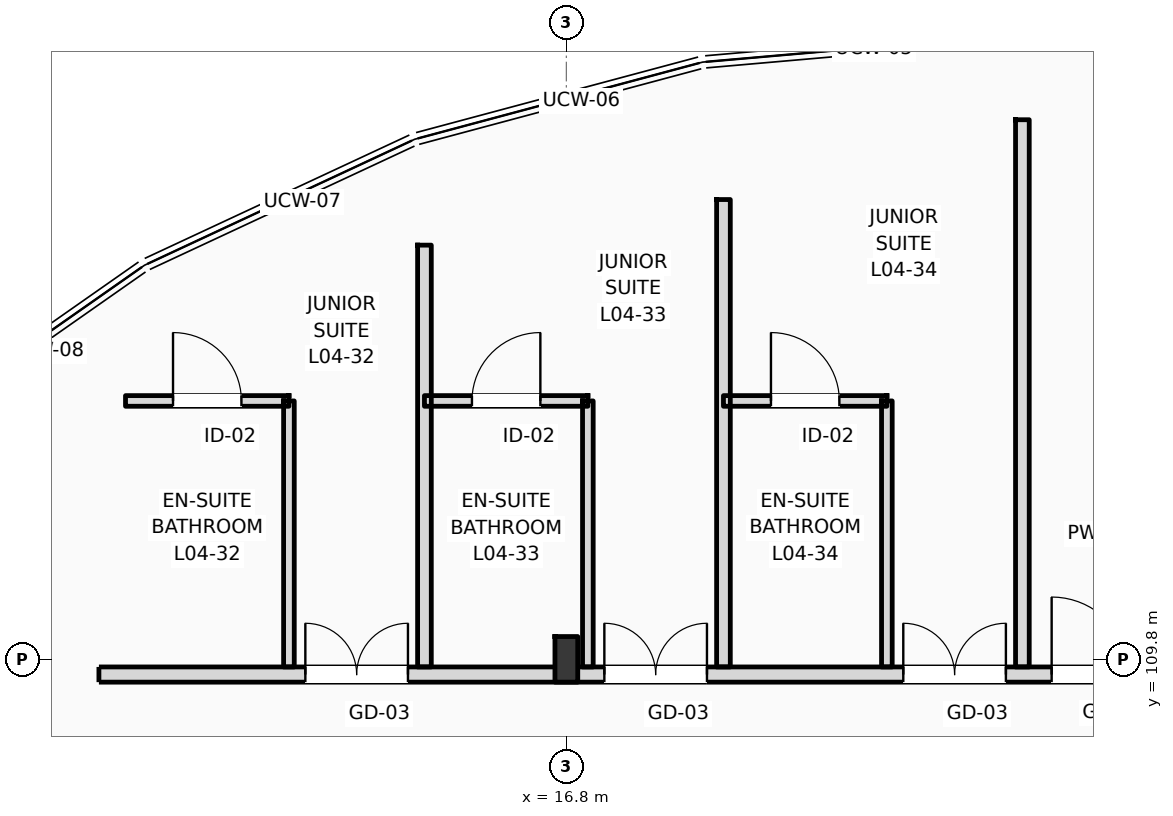
"""IFC4 building model, lengths in metres.
Left out: names, types, materials, properties, quantities, classifications, styles, units other than length and angle.
Written with IfcOpenShell. Run it as: python <this file> out.ifc"""

import sys

from ifc_helpers import new_model, si_unit, direction, frame, frame_2d, origin, origin_2d, place, context, subcontext, project, spatial, rectangle, i_section, extrude, element, fill, save


model = new_model("IFC4")
c1 = context("Model", 3, precision=1e-05, world=origin(), true_north=direction((0.0, 1.0)))
c2 = subcontext(c1, "Body", "Model", "MODEL_VIEW")
j1 = project(units=[si_unit("LENGTHUNIT", "METRE"), si_unit("PLANEANGLEUNIT", "RADIAN")], contexts=[c1])
p1 = place(None, origin())
s1 = spatial("IfcSite", under=j1, at=p1, CompositionType="ELEMENT")
p2 = place(p1, origin())
s2 = spatial("IfcBuilding", under=s1, at=p2, CompositionType="ELEMENT")
p3 = place(p2, frame((0.0, 0.0, 20.4)))
s3 = spatial("IfcBuildingStorey", under=s2, at=p3, CompositionType="ELEMENT", Elevation=20.4)
p4 = place(p3, frame((16.8, 109.8, 0.0), z_axis=(0.0, 0.0, 1.0), x_axis=(1.0, 0.0, 0.0)))
e1 = element("IfcColumn", 1, at=p4, inside=s3, PredefinedType="COLUMN", context=c2, shape_type="SweptSolid", body=[
    extrude(i_section(OverallWidth=0.3, OverallDepth=0.6, WebThickness=0.015, FlangeThickness=0.03, FilletRadius=0.027, at=origin_2d()), origin(), (0.0, 0.0, 1.0), 4.2),
])
p5 = place(p3, frame((10.65, 109.6, 0.0), z_axis=(0.0, 0.0, 1.0), x_axis=(1.0, 0.0, 0.0)))
e2 = element("IfcWall", 2, at=p5, inside=s3, PredefinedType="PARTITIONING", context=c2, shape_type="SweptSolid", body=[
    extrude(rectangle(XDim=109.21, YDim=0.2, at=frame_2d((54.605, 0.0))), origin(), (0.0, 0.0, 1.0), 3.38),
])
p6 = place(p5, frame((12.535, 0.0, 0.0)))
e3 = element("IfcOpeningElement", 3, at=p6, cuts=e2, PredefinedType="OPENING", context=c2, shape_type="SweptSolid", body=[
    extrude(rectangle(XDim=1.02, YDim=2.2, at=frame_2d((0.51, 1.1))), frame((0.0, 0.11, 0.0), z_axis=(0.0, -1.0, 0.0), x_axis=(1.0, 0.0, 0.0)), (0.0, 0.0, 1.0), 0.22),
])
p7 = place(p5, frame((19.175, 0.0, 0.0)))
e4 = element("IfcOpeningElement", 4, at=p7, cuts=e2, PredefinedType="OPENING", context=c2, shape_type="SweptSolid", body=[
    extrude(rectangle(XDim=1.02, YDim=2.2, at=frame_2d((0.51, 1.1))), frame((0.0, 0.11, 0.0), z_axis=(0.0, -1.0, 0.0), x_axis=(1.0, 0.0, 0.0)), (0.0, 0.0, 1.0), 0.22),
])
p8 = place(p5, frame((23.375, 0.0, 0.0)))
e5 = element("IfcOpeningElement", 5, at=p8, cuts=e2, PredefinedType="OPENING", context=c2, shape_type="SweptSolid", body=[
    extrude(rectangle(XDim=1.02, YDim=2.2, at=frame_2d((0.51, 1.1))), frame((0.0, 0.11, 0.0), z_axis=(0.0, -1.0, 0.0), x_axis=(1.0, 0.0, 0.0)), (0.0, 0.0, 1.0), 0.22),
])
p9 = place(p5, frame((27.575, 0.0, 0.0)))
e6 = element("IfcOpeningElement", 6, at=p9, cuts=e2, PredefinedType="OPENING", context=c2, shape_type="SweptSolid", body=[
    extrude(rectangle(XDim=1.02, YDim=2.2, at=frame_2d((0.51, 1.1))), frame((0.0, 0.11, 0.0), z_axis=(0.0, -1.0, 0.0), x_axis=(1.0, 0.0, 0.0)), (0.0, 0.0, 1.0), 0.22),
])
p10 = place(p5, frame((31.805, 0.0, 0.0)))
e7 = element("IfcOpeningElement", 7, at=p10, cuts=e2, PredefinedType="OPENING", context=c2, shape_type="SweptSolid", body=[
    extrude(rectangle(XDim=0.96, YDim=2.2, at=frame_2d((0.48, 1.1))), frame((0.0, 0.11, 0.0), z_axis=(0.0, -1.0, 0.0), x_axis=(1.0, 0.0, 0.0)), (0.0, 0.0, 1.0), 0.22),
])
p11 = place(p5, frame((33.855, 0.0, 0.0)))
e8 = element("IfcOpeningElement", 8, at=p11, cuts=e2, PredefinedType="OPENING", context=c2, shape_type="SweptSolid", body=[
    extrude(rectangle(XDim=0.96, YDim=2.2, at=frame_2d((0.48, 1.1))), frame((0.0, 0.11, 0.0), z_axis=(0.0, -1.0, 0.0), x_axis=(1.0, 0.0, 0.0)), (0.0, 0.0, 1.0), 0.22),
])
p12 = place(p5, frame((40.205, 0.0, 0.0)))
e9 = element("IfcOpeningElement", 9, at=p12, cuts=e2, PredefinedType="OPENING", context=c2, shape_type="SweptSolid", body=[
    extrude(rectangle(XDim=0.96, YDim=2.2, at=frame_2d((0.48, 1.1))), frame((0.0, 0.11, 0.0), z_axis=(0.0, -1.0, 0.0), x_axis=(1.0, 0.0, 0.0)), (0.0, 0.0, 1.0), 0.22),
])
p13 = place(p5, frame((42.255, 0.0, 0.0)))
e10 = element("IfcOpeningElement", 10, at=p13, cuts=e2, PredefinedType="OPENING", context=c2, shape_type="SweptSolid", body=[
    extrude(rectangle(XDim=0.96, YDim=2.2, at=frame_2d((0.48, 1.1))), frame((0.0, 0.11, 0.0), z_axis=(0.0, -1.0, 0.0), x_axis=(1.0, 0.0, 0.0)), (0.0, 0.0, 1.0), 0.22),
])
p14 = place(p5, frame((48.605, 0.0, 0.0)))
e11 = element("IfcOpeningElement", 11, at=p14, cuts=e2, PredefinedType="OPENING", context=c2, shape_type="SweptSolid", body=[
    extrude(rectangle(XDim=0.96, YDim=2.2, at=frame_2d((0.48, 1.1))), frame((0.0, 0.11, 0.0), z_axis=(0.0, -1.0, 0.0), x_axis=(1.0, 0.0, 0.0)), (0.0, 0.0, 1.0), 0.22),
])
p15 = place(p5, frame((50.655, 0.0, 0.0)))
e12 = element("IfcOpeningElement", 12, at=p15, cuts=e2, PredefinedType="OPENING", context=c2, shape_type="SweptSolid", body=[
    extrude(rectangle(XDim=0.96, YDim=2.2, at=frame_2d((0.48, 1.1))), frame((0.0, 0.11, 0.0), z_axis=(0.0, -1.0, 0.0), x_axis=(1.0, 0.0, 0.0)), (0.0, 0.0, 1.0), 0.22),
])
p16 = place(p5, frame((57.005, 0.0, 0.0)))
e13 = element("IfcOpeningElement", 13, at=p16, cuts=e2, PredefinedType="OPENING", context=c2, shape_type="SweptSolid", body=[
    extrude(rectangle(XDim=0.96, YDim=2.2, at=frame_2d((0.48, 1.1))), frame((0.0, 0.11, 0.0), z_axis=(0.0, -1.0, 0.0), x_axis=(1.0, 0.0, 0.0)), (0.0, 0.0, 1.0), 0.22),
])
p17 = place(p5, frame((59.055, 0.0, 0.0)))
e14 = element("IfcOpeningElement", 14, at=p17, cuts=e2, PredefinedType="OPENING", context=c2, shape_type="SweptSolid", body=[
    extrude(rectangle(XDim=0.96, YDim=2.2, at=frame_2d((0.48, 1.1))), frame((0.0, 0.11, 0.0), z_axis=(0.0, -1.0, 0.0), x_axis=(1.0, 0.0, 0.0)), (0.0, 0.0, 1.0), 0.22),
])
p18 = place(p5, frame((65.405, 0.0, 0.0)))
e15 = element("IfcOpeningElement", 15, at=p18, cuts=e2, PredefinedType="OPENING", context=c2, shape_type="SweptSolid", body=[
    extrude(rectangle(XDim=0.96, YDim=2.2, at=frame_2d((0.48, 1.1))), frame((0.0, 0.11, 0.0), z_axis=(0.0, -1.0, 0.0), x_axis=(1.0, 0.0, 0.0)), (0.0, 0.0, 1.0), 0.22),
])
p19 = place(p5, frame((67.205, 0.0, 0.0)))
e16 = element("IfcOpeningElement", 16, at=p19, cuts=e2, PredefinedType="OPENING", context=c2, shape_type="SweptSolid", body=[
    extrude(rectangle(XDim=0.96, YDim=2.2, at=frame_2d((0.48, 1.1))), frame((0.0, 0.11, 0.0), z_axis=(0.0, -1.0, 0.0), x_axis=(1.0, 0.0, 0.0)), (0.0, 0.0, 1.0), 0.22),
])
p20 = place(p5, frame((73.805, 0.0, 0.0)))
e17 = element("IfcOpeningElement", 17, at=p20, cuts=e2, PredefinedType="OPENING", context=c2, shape_type="SweptSolid", body=[
    extrude(rectangle(XDim=0.96, YDim=2.2, at=frame_2d((0.48, 1.1))), frame((0.0, 0.11, 0.0), z_axis=(0.0, -1.0, 0.0), x_axis=(1.0, 0.0, 0.0)), (0.0, 0.0, 1.0), 0.22),
])
p21 = place(p5, frame((78.255, 0.0, 0.0)))
e18 = element("IfcOpeningElement", 18, at=p21, cuts=e2, PredefinedType="OPENING", context=c2, shape_type="SweptSolid", body=[
    extrude(rectangle(XDim=0.96, YDim=2.2, at=frame_2d((0.48, 1.1))), frame((0.0, 0.11, 0.0), z_axis=(0.0, -1.0, 0.0), x_axis=(1.0, 0.0, 0.0)), (0.0, 0.0, 1.0), 0.22),
])
p22 = place(p5, frame((82.205, 0.0, 0.0)))
e19 = element("IfcOpeningElement", 19, at=p22, cuts=e2, PredefinedType="OPENING", context=c2, shape_type="SweptSolid", body=[
    extrude(rectangle(XDim=0.96, YDim=2.2, at=frame_2d((0.48, 1.1))), frame((0.0, 0.11, 0.0), z_axis=(0.0, -1.0, 0.0), x_axis=(1.0, 0.0, 0.0)), (0.0, 0.0, 1.0), 0.22),
])
p23 = place(p5, frame((86.405, 0.0, 0.0)))
e20 = element("IfcOpeningElement", 20, at=p23, cuts=e2, PredefinedType="OPENING", context=c2, shape_type="SweptSolid", body=[
    extrude(rectangle(XDim=0.96, YDim=2.2, at=frame_2d((0.48, 1.1))), frame((0.0, 0.11, 0.0), z_axis=(0.0, -1.0, 0.0), x_axis=(1.0, 0.0, 0.0)), (0.0, 0.0, 1.0), 0.22),
])
p24 = place(p5, frame((90.605, 0.0, 0.0)))
e21 = element("IfcOpeningElement", 21, at=p24, cuts=e2, PredefinedType="OPENING", context=c2, shape_type="SweptSolid", body=[
    extrude(rectangle(XDim=0.96, YDim=2.2, at=frame_2d((0.48, 1.1))), frame((0.0, 0.11, 0.0), z_axis=(0.0, -1.0, 0.0), x_axis=(1.0, 0.0, 0.0)), (0.0, 0.0, 1.0), 0.22),
])
p25 = place(p5, frame((94.805, 0.0, 0.0)))
e22 = element("IfcOpeningElement", 22, at=p25, cuts=e2, PredefinedType="OPENING", context=c2, shape_type="SweptSolid", body=[
    extrude(rectangle(XDim=0.96, YDim=2.2, at=frame_2d((0.48, 1.1))), frame((0.0, 0.11, 0.0), z_axis=(0.0, -1.0, 0.0), x_axis=(1.0, 0.0, 0.0)), (0.0, 0.0, 1.0), 0.22),
])
p26 = place(p5, frame((99.005, 0.0, 0.0)))
e23 = element("IfcOpeningElement", 23, at=p26, cuts=e2, PredefinedType="OPENING", context=c2, shape_type="SweptSolid", body=[
    extrude(rectangle(XDim=0.96, YDim=2.2, at=frame_2d((0.48, 1.1))), frame((0.0, 0.11, 0.0), z_axis=(0.0, -1.0, 0.0), x_axis=(1.0, 0.0, 0.0)), (0.0, 0.0, 1.0), 0.22),
])
p27 = place(p5, frame((103.205, 0.0, 0.0)))
e24 = element("IfcOpeningElement", 24, at=p27, cuts=e2, PredefinedType="OPENING", context=c2, shape_type="SweptSolid", body=[
    extrude(rectangle(XDim=0.96, YDim=2.2, at=frame_2d((0.48, 1.1))), frame((0.0, 0.11, 0.0), z_axis=(0.0, -1.0, 0.0), x_axis=(1.0, 0.0, 0.0)), (0.0, 0.0, 1.0), 0.22),
])
p28 = place(p5, frame((105.335, 0.0, 0.0)))
e25 = element("IfcOpeningElement", 25, at=p28, cuts=e2, PredefinedType="OPENING", context=c2, shape_type="SweptSolid", body=[
    extrude(rectangle(XDim=0.96, YDim=2.2, at=frame_2d((0.48, 1.1))), frame((0.0, 0.11, 0.0), z_axis=(0.0, -1.0, 0.0), x_axis=(1.0, 0.0, 0.0)), (0.0, 0.0, 1.0), 0.22),
])
p29 = place(p5, frame((2.716, 0.0, 0.0)))
e26 = element("IfcOpeningElement", 26, at=p29, cuts=e2, PredefinedType="OPENING", context=c2, shape_type="SweptSolid", body=[
    extrude(rectangle(XDim=1.35, YDim=2.25, at=frame_2d((0.675, 1.125))), frame((0.0, 0.11, 0.0), z_axis=(0.0, -1.0, 0.0), x_axis=(1.0, 0.0, 0.0)), (0.0, 0.0, 1.0), 0.22),
])
p30 = place(p5, frame((6.65, 0.0, 0.0)))
e27 = element("IfcOpeningElement", 27, at=p30, cuts=e2, PredefinedType="OPENING", context=c2, shape_type="SweptSolid", body=[
    extrude(rectangle(XDim=1.35, YDim=2.25, at=frame_2d((0.675, 1.125))), frame((0.0, 0.11, 0.0), z_axis=(0.0, -1.0, 0.0), x_axis=(1.0, 0.0, 0.0)), (0.0, 0.0, 1.0), 0.22),
])
p31 = place(p5, frame((10.583, 0.0, 0.0)))
e28 = element("IfcOpeningElement", 28, at=p31, cuts=e2, PredefinedType="OPENING", context=c2, shape_type="SweptSolid", body=[
    extrude(rectangle(XDim=1.35, YDim=2.25, at=frame_2d((0.675, 1.125))), frame((0.0, 0.11, 0.0), z_axis=(0.0, -1.0, 0.0), x_axis=(1.0, 0.0, 0.0)), (0.0, 0.0, 1.0), 0.22),
])
p32 = place(p3, frame((14.933, 109.7, 0.0), z_axis=(0.0, 0.0, 1.0), x_axis=(0.0, 1.0, 0.0)))
e29 = element("IfcWall", 29, at=p32, inside=s3, PredefinedType="PARTITIONING", context=c2, shape_type="SweptSolid", body=[
    extrude(rectangle(XDim=5.55, YDim=0.18, at=frame_2d((2.775, 0.0))), origin(), (0.0, 0.0, 1.0), 3.94),
])
p33 = place(p3, frame((13.15, 109.7, 0.0), z_axis=(0.0, 0.0, 1.0), x_axis=(0.0, 1.0, 0.0)))
e30 = element("IfcWall", 30, at=p33, inside=s3, PredefinedType="PARTITIONING", context=c2, shape_type="SweptSolid", body=[
    extrude(rectangle(XDim=3.5, YDim=0.14, at=frame_2d((1.75, 0.0))), origin(), (0.0, 0.0, 1.0), 3.94),
])
p34 = place(p3, frame((11.0, 113.2, 0.0), z_axis=(0.0, 0.0, 1.0), x_axis=(1.0, 0.0, 0.0)))
e31 = element("IfcWall", 31, at=p34, inside=s3, PredefinedType="PARTITIONING", context=c2, shape_type="SweptSolid", body=[
    extrude(rectangle(XDim=2.15, YDim=0.14, at=frame_2d((1.075, 0.0))), origin(), (0.0, 0.0, 1.0), 3.94),
])
p35 = place(p34, frame((0.625, 0.0, 0.0)))
e32 = element("IfcOpeningElement", 32, at=p35, cuts=e31, PredefinedType="OPENING", context=c2, shape_type="SweptSolid", body=[
    extrude(rectangle(XDim=0.9, YDim=2.1, at=frame_2d((0.45, 1.05))), frame((0.0, 0.08, 0.0), z_axis=(0.0, -1.0, 0.0), x_axis=(1.0, 0.0, 0.0)), (0.0, 0.0, 1.0), 0.16),
])
p36 = place(p3, frame((18.867, 109.7, 0.0), z_axis=(0.0, 0.0, 1.0), x_axis=(0.0, 1.0, 0.0)))
e33 = element("IfcWall", 33, at=p36, inside=s3, PredefinedType="PARTITIONING", context=c2, shape_type="SweptSolid", body=[
    extrude(rectangle(XDim=6.15, YDim=0.18, at=frame_2d((3.075, 0.0))), origin(), (0.0, 0.0, 1.0), 3.94),
])
p37 = place(p3, frame((17.083, 109.7, 0.0), z_axis=(0.0, 0.0, 1.0), x_axis=(0.0, 1.0, 0.0)))
e34 = element("IfcWall", 34, at=p37, inside=s3, PredefinedType="PARTITIONING", context=c2, shape_type="SweptSolid", body=[
    extrude(rectangle(XDim=3.5, YDim=0.14, at=frame_2d((1.75, 0.0))), origin(), (0.0, 0.0, 1.0), 3.94),
])
p38 = place(p3, frame((14.933, 113.2, 0.0), z_axis=(0.0, 0.0, 1.0), x_axis=(1.0, 0.0, 0.0)))
e35 = element("IfcWall", 35, at=p38, inside=s3, PredefinedType="PARTITIONING", context=c2, shape_type="SweptSolid", body=[
    extrude(rectangle(XDim=2.15, YDim=0.14, at=frame_2d((1.075, 0.0))), origin(), (0.0, 0.0, 1.0), 3.94),
])
p39 = place(p38, frame((0.625, 0.0, 0.0)))
e36 = element("IfcOpeningElement", 36, at=p39, cuts=e35, PredefinedType="OPENING", context=c2, shape_type="SweptSolid", body=[
    extrude(rectangle(XDim=0.9, YDim=2.1, at=frame_2d((0.45, 1.05))), frame((0.0, 0.08, 0.0), z_axis=(0.0, -1.0, 0.0), x_axis=(1.0, 0.0, 0.0)), (0.0, 0.0, 1.0), 0.16),
])
p40 = place(p3, frame((22.8, 109.7, 0.0), z_axis=(0.0, 0.0, 1.0), x_axis=(0.0, 1.0, 0.0)))
e37 = element("IfcWall", 37, at=p40, inside=s3, PredefinedType="PARTITIONING", context=c2, shape_type="SweptSolid", body=[
    extrude(rectangle(XDim=7.2, YDim=0.18, at=frame_2d((3.6, 0.0))), origin(), (0.0, 0.0, 1.0), 3.94),
])
p41 = place(p3, frame((21.017, 109.7, 0.0), z_axis=(0.0, 0.0, 1.0), x_axis=(0.0, 1.0, 0.0)))
e38 = element("IfcWall", 38, at=p41, inside=s3, PredefinedType="PARTITIONING", context=c2, shape_type="SweptSolid", body=[
    extrude(rectangle(XDim=3.5, YDim=0.14, at=frame_2d((1.75, 0.0))), origin(), (0.0, 0.0, 1.0), 3.94),
])
p42 = place(p3, frame((18.867, 113.2, 0.0), z_axis=(0.0, 0.0, 1.0), x_axis=(1.0, 0.0, 0.0)))
e39 = element("IfcWall", 39, at=p42, inside=s3, PredefinedType="PARTITIONING", context=c2, shape_type="SweptSolid", body=[
    extrude(rectangle(XDim=2.15, YDim=0.14, at=frame_2d((1.075, 0.0))), origin(), (0.0, 0.0, 1.0), 3.94),
])
p43 = place(p42, frame((0.625, 0.0, 0.0)))
e40 = element("IfcOpeningElement", 40, at=p43, cuts=e39, PredefinedType="OPENING", context=c2, shape_type="SweptSolid", body=[
    extrude(rectangle(XDim=0.9, YDim=2.1, at=frame_2d((0.45, 1.05))), frame((0.0, 0.08, 0.0), z_axis=(0.0, -1.0, 0.0), x_axis=(1.0, 0.0, 0.0)), (0.0, 0.0, 1.0), 0.16),
])
p44 = place(p6, origin())
e41 = element("IfcDoor", 41, at=p44, inside=s3, OperationType="SINGLE_SWING_LEFT", PredefinedType="DOOR", context=c2, shape_type="SweptSolid", body=[
    extrude(rectangle(XDim=1.02, YDim=2.2, at=frame_2d((0.51, 1.1))), frame((0.0, 0.025, 0.0), z_axis=(0.0, -1.0, 0.0), x_axis=(1.0, 0.0, 0.0)), (0.0, 0.0, 1.0), 0.05),
])
fill(e3, e41)
p45 = place(p29, origin())
e42 = element("IfcDoor", 42, at=p45, inside=s3, OperationType="DOUBLE_SWING_LEFT", PredefinedType="DOOR", context=c2, shape_type="SweptSolid", body=[
    extrude(rectangle(XDim=1.35, YDim=2.25, at=frame_2d((0.675, 1.125))), frame((0.0, 0.025, 0.0), z_axis=(0.0, -1.0, 0.0), x_axis=(1.0, 0.0, 0.0)), (0.0, 0.0, 1.0), 0.05),
])
fill(e26, e42)
p46 = place(p35, origin())
e43 = element("IfcDoor", 43, at=p46, inside=s3, OperationType="SINGLE_SWING_LEFT", PredefinedType="DOOR", context=c2, shape_type="SweptSolid", body=[
    extrude(rectangle(XDim=0.9, YDim=2.1, at=frame_2d((0.45, 1.05))), frame((0.0, 0.025, 0.0), z_axis=(0.0, -1.0, 0.0), x_axis=(1.0, 0.0, 0.0)), (0.0, 0.0, 1.0), 0.05),
])
fill(e32, e43)
p47 = place(p30, origin())
e44 = element("IfcDoor", 44, at=p47, inside=s3, OperationType="DOUBLE_SWING_LEFT", PredefinedType="DOOR", context=c2, shape_type="SweptSolid", body=[
    extrude(rectangle(XDim=1.35, YDim=2.25, at=frame_2d((0.675, 1.125))), frame((0.0, 0.025, 0.0), z_axis=(0.0, -1.0, 0.0), x_axis=(1.0, 0.0, 0.0)), (0.0, 0.0, 1.0), 0.05),
])
fill(e27, e44)
p48 = place(p39, origin())
e45 = element("IfcDoor", 45, at=p48, inside=s3, OperationType="SINGLE_SWING_RIGHT", PredefinedType="DOOR", context=c2, shape_type="SweptSolid", body=[
    extrude(rectangle(XDim=0.9, YDim=2.1, at=frame_2d((0.45, 1.05))), frame((0.0, 0.025, 0.0), z_axis=(0.0, -1.0, 0.0), x_axis=(1.0, 0.0, 0.0)), (0.0, 0.0, 1.0), 0.05),
])
fill(e36, e45)
p49 = place(p31, origin())
e46 = element("IfcDoor", 46, at=p49, inside=s3, OperationType="DOUBLE_SWING_LEFT", PredefinedType="DOOR", context=c2, shape_type="SweptSolid", body=[
    extrude(rectangle(XDim=1.35, YDim=2.25, at=frame_2d((0.675, 1.125))), frame((0.0, 0.025, 0.0), z_axis=(0.0, -1.0, 0.0), x_axis=(1.0, 0.0, 0.0)), (0.0, 0.0, 1.0), 0.05),
])
fill(e28, e46)
p50 = place(p43, origin())
e47 = element("IfcDoor", 47, at=p50, inside=s3, OperationType="SINGLE_SWING_LEFT", PredefinedType="DOOR", context=c2, shape_type="SweptSolid", body=[
    extrude(rectangle(XDim=0.9, YDim=2.1, at=frame_2d((0.45, 1.05))), frame((0.0, 0.025, 0.0), z_axis=(0.0, -1.0, 0.0), x_axis=(1.0, 0.0, 0.0)), (0.0, 0.0, 1.0), 0.05),
])
fill(e40, e47)
save(model, sys.argv[1])
